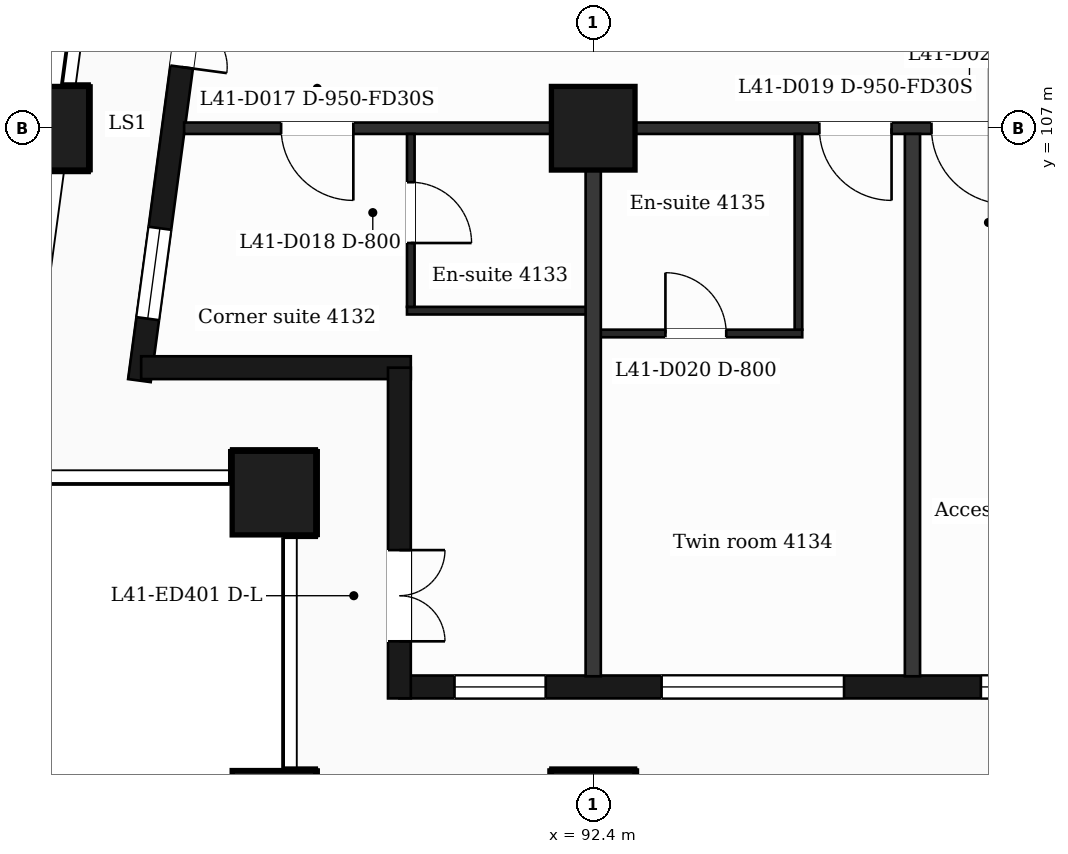
"""IFC4 building model, lengths in metres.
Left out: names, types, materials, properties, quantities, classifications, styles, units other than length and angle.
Written with IfcOpenShell. Run it as: python <this file> out.ifc"""

import sys

from ifc_helpers import new_model, si_unit, direction, frame, frame_2d, origin, origin_2d, place, context, subcontext, project, spatial, rectangle, extrude, element, fill, save


model = new_model("IFC4")
c1 = context("Model", 3, precision=1e-05, world=origin(), true_north=direction((0.0, 1.0)))
c2 = subcontext(c1, "Body", "Model", "MODEL_VIEW")
j1 = project(units=[si_unit("LENGTHUNIT", "METRE"), si_unit("PLANEANGLEUNIT", "RADIAN")], contexts=[c1])
p1 = place(None, origin())
s1 = spatial("IfcSite", under=j1, at=p1, CompositionType="ELEMENT")
p2 = place(p1, origin())
s2 = spatial("IfcBuilding", under=s1, at=p2, CompositionType="ELEMENT")
p3 = place(p2, frame((0.0, 0.0, 173.7)))
s3 = spatial("IfcBuildingStorey", under=s2, at=p3, CompositionType="ELEMENT", Elevation=173.7)
for number, where, z_axis, x_axis in (
    (1, (92.4, 98.0, 0.0), (0.0, 0.0, 1.0), (1.0, 0.0, 0.0)),
    (2, (88.2, 98.0, 0.0), (0.0, 0.0, 1.0), (1.0, 0.0, 0.0)),
    (3, (88.2, 102.2, 0.0), (0.0, 0.0, 1.0), (1.0, 0.0, 0.0)),
    (4, (92.4, 107.0, 0.0), (0.0, 0.0, 1.0), (1.0, 0.0, 0.0)),
    (5, (85.211, 107.0, 0.0), (0.0, 0.0, 1.0), (1.0, 0.0, 0.0)),
):
    element("IfcColumn", number, at=place(p3, frame(where, z_axis=z_axis, x_axis=x_axis)), inside=s3, PredefinedType="COLUMN", context=c2, shape_type="SweptSolid", body=[
        extrude(rectangle(XDim=1.1, YDim=1.1, at=origin_2d()), origin(), (0.0, 0.0, 1.0), 3.7),
    ])
p4 = place(p3, frame((89.85, 99.65, 0.0), z_axis=(0.0, 0.0, 1.0), x_axis=(1.0, 0.0, 0.0)))
e6 = element("IfcWall", 6, at=p4, inside=s3, PredefinedType="SOLIDWALL", context=c2, shape_type="SweptSolid", body=[
    extrude(rectangle(XDim=47.25, YDim=0.3, at=frame_2d((23.625, 0.0))), origin(), (0.0, 0.0, 1.0), 3.38),
])
p5 = place(p4, frame((0.725, 0.0, 0.9)))
e7 = element("IfcOpeningElement", 7, at=p5, cuts=e6, PredefinedType="OPENING", context=c2, shape_type="SweptSolid", body=[
    extrude(rectangle(XDim=1.2, YDim=2.1, at=frame_2d((0.6, 1.05))), frame((0.0, 0.16, 0.0), z_axis=(0.0, -1.0, 0.0), x_axis=(1.0, 0.0, 0.0)), (0.0, 0.0, 1.0), 0.32),
])
p6 = place(p4, frame((3.45, 0.0, 0.9)))
e8 = element("IfcOpeningElement", 8, at=p6, cuts=e6, PredefinedType="OPENING", context=c2, shape_type="SweptSolid", body=[
    extrude(rectangle(XDim=2.4, YDim=2.1, at=frame_2d((1.2, 1.05))), frame((0.0, 0.16, 0.0), z_axis=(0.0, -1.0, 0.0), x_axis=(1.0, 0.0, 0.0)), (0.0, 0.0, 1.0), 0.32),
])
p7 = place(p4, frame((7.65, 0.0, 0.9)))
e9 = element("IfcOpeningElement", 9, at=p7, cuts=e6, PredefinedType="OPENING", context=c2, shape_type="SweptSolid", body=[
    extrude(rectangle(XDim=2.4, YDim=2.1, at=frame_2d((1.2, 1.05))), frame((0.0, 0.16, 0.0), z_axis=(0.0, -1.0, 0.0), x_axis=(1.0, 0.0, 0.0)), (0.0, 0.0, 1.0), 0.32),
])
p8 = place(p4, frame((11.85, 0.0, 0.9)))
e10 = element("IfcOpeningElement", 10, at=p8, cuts=e6, PredefinedType="OPENING", context=c2, shape_type="SweptSolid", body=[
    extrude(rectangle(XDim=2.4, YDim=2.1, at=frame_2d((1.2, 1.05))), frame((0.0, 0.16, 0.0), z_axis=(0.0, -1.0, 0.0), x_axis=(1.0, 0.0, 0.0)), (0.0, 0.0, 1.0), 0.32),
])
p9 = place(p4, frame((16.05, 0.0, 0.9)))
e11 = element("IfcOpeningElement", 11, at=p9, cuts=e6, PredefinedType="OPENING", context=c2, shape_type="SweptSolid", body=[
    extrude(rectangle(XDim=2.4, YDim=2.1, at=frame_2d((1.2, 1.05))), frame((0.0, 0.16, 0.0), z_axis=(0.0, -1.0, 0.0), x_axis=(1.0, 0.0, 0.0)), (0.0, 0.0, 1.0), 0.32),
])
p10 = place(p4, frame((20.25, 0.0, 0.9)))
e12 = element("IfcOpeningElement", 12, at=p10, cuts=e6, PredefinedType="OPENING", context=c2, shape_type="SweptSolid", body=[
    extrude(rectangle(XDim=2.4, YDim=2.1, at=frame_2d((1.2, 1.05))), frame((0.0, 0.16, 0.0), z_axis=(0.0, -1.0, 0.0), x_axis=(1.0, 0.0, 0.0)), (0.0, 0.0, 1.0), 0.32),
])
p11 = place(p4, frame((25.05, 0.0, 0.9)))
e13 = element("IfcOpeningElement", 13, at=p11, cuts=e6, PredefinedType="OPENING", context=c2, shape_type="SweptSolid", body=[
    extrude(rectangle(XDim=1.2, YDim=2.1, at=frame_2d((0.6, 1.05))), frame((0.0, 0.16, 0.0), z_axis=(0.0, -1.0, 0.0), x_axis=(1.0, 0.0, 0.0)), (0.0, 0.0, 1.0), 0.32),
])
p12 = place(p4, frame((29.25, 0.0, 0.9)))
e14 = element("IfcOpeningElement", 14, at=p12, cuts=e6, PredefinedType="OPENING", context=c2, shape_type="SweptSolid", body=[
    extrude(rectangle(XDim=1.2, YDim=2.1, at=frame_2d((0.6, 1.05))), frame((0.0, 0.16, 0.0), z_axis=(0.0, -1.0, 0.0), x_axis=(1.0, 0.0, 0.0)), (0.0, 0.0, 1.0), 0.32),
])
p13 = place(p4, frame((32.55, 0.0, 0.0)))
e15 = element("IfcOpeningElement", 15, at=p13, cuts=e6, PredefinedType="OPENING", context=c2, shape_type="SweptSolid", body=[
    extrude(rectangle(XDim=1.2, YDim=2.4, at=frame_2d((0.6, 1.2))), frame((0.0, 0.16, 0.0), z_axis=(0.0, -1.0, 0.0), x_axis=(1.0, 0.0, 0.0)), (0.0, 0.0, 1.0), 0.32),
])
p14 = place(p4, frame((34.35, 0.0, 0.9)))
e16 = element("IfcOpeningElement", 16, at=p14, cuts=e6, PredefinedType="OPENING", context=c2, shape_type="SweptSolid", body=[
    extrude(rectangle(XDim=1.2, YDim=2.1, at=frame_2d((0.6, 1.05))), frame((0.0, 0.16, 0.0), z_axis=(0.0, -1.0, 0.0), x_axis=(1.0, 0.0, 0.0)), (0.0, 0.0, 1.0), 0.32),
])
p15 = place(p4, frame((37.05, 0.0, 0.9)))
e17 = element("IfcOpeningElement", 17, at=p15, cuts=e6, PredefinedType="OPENING", context=c2, shape_type="SweptSolid", body=[
    extrude(rectangle(XDim=2.4, YDim=2.1, at=frame_2d((1.2, 1.05))), frame((0.0, 0.16, 0.0), z_axis=(0.0, -1.0, 0.0), x_axis=(1.0, 0.0, 0.0)), (0.0, 0.0, 1.0), 0.32),
])
p16 = place(p4, frame((40.95, 0.0, 0.0)))
e18 = element("IfcOpeningElement", 18, at=p16, cuts=e6, PredefinedType="OPENING", context=c2, shape_type="SweptSolid", body=[
    extrude(rectangle(XDim=1.2, YDim=2.4, at=frame_2d((0.6, 1.2))), frame((0.0, 0.16, 0.0), z_axis=(0.0, -1.0, 0.0), x_axis=(1.0, 0.0, 0.0)), (0.0, 0.0, 1.0), 0.32),
])
p17 = place(p4, frame((42.75, 0.0, 0.9)))
e19 = element("IfcOpeningElement", 19, at=p17, cuts=e6, PredefinedType="OPENING", context=c2, shape_type="SweptSolid", body=[
    extrude(rectangle(XDim=1.2, YDim=2.1, at=frame_2d((0.6, 1.05))), frame((0.0, 0.16, 0.0), z_axis=(0.0, -1.0, 0.0), x_axis=(1.0, 0.0, 0.0)), (0.0, 0.0, 1.0), 0.32),
])
p18 = place(p4, frame((45.25, 0.0, 0.9)))
e20 = element("IfcOpeningElement", 20, at=p18, cuts=e6, PredefinedType="OPENING", context=c2, shape_type="SweptSolid", body=[
    extrude(rectangle(XDim=1.2, YDim=2.1, at=frame_2d((0.6, 1.05))), frame((0.0, 0.16, 0.0), z_axis=(0.0, -1.0, 0.0), x_axis=(1.0, 0.0, 0.0)), (0.0, 0.0, 1.0), 0.32),
])
p19 = place(p3, frame((87.334, 110.4, 0.0), z_axis=(0.0, 0.0, 1.0), x_axis=(-0.133437175554, -0.991057273915, 0.0)))
e21 = element("IfcWall", 21, at=p19, inside=s3, PredefinedType="SOLIDWALL", context=c2, shape_type="SweptSolid", body=[
    extrude(rectangle(XDim=6.781, YDim=0.3, at=frame_2d((3.39, 0.0))), origin(), (0.0, 0.0, 1.0), 3.38),
])
p20 = place(p19, frame((1.418, 0.0, 0.0)))
e22 = element("IfcOpeningElement", 22, at=p20, cuts=e21, PredefinedType="OPENING", context=c2, shape_type="SweptSolid", body=[
    extrude(rectangle(XDim=1.2, YDim=2.4, at=frame_2d((0.6, 1.2))), frame((0.0, 0.16, 0.0), z_axis=(0.0, -1.0, 0.0), x_axis=(1.0, 0.0, 0.0)), (0.0, 0.0, 1.0), 0.32),
])
p21 = place(p19, frame((4.758, 0.0, 0.9)))
e23 = element("IfcOpeningElement", 23, at=p21, cuts=e21, PredefinedType="OPENING", context=c2, shape_type="SweptSolid", body=[
    extrude(rectangle(XDim=1.2, YDim=2.1, at=frame_2d((0.6, 1.05))), frame((0.0, 0.16, 0.0), z_axis=(0.0, -1.0, 0.0), x_axis=(1.0, 0.0, 0.0)), (0.0, 0.0, 1.0), 0.32),
])
p22 = place(p3, frame((86.452, 103.85, 0.0), z_axis=(0.0, 0.0, 1.0), x_axis=(1.0, 0.0, 0.0)))
e24 = element("IfcWall", 24, at=p22, inside=s3, PredefinedType="SOLIDWALL", context=c2, shape_type="SweptSolid", body=[
    extrude(rectangle(XDim=3.548, YDim=0.3, at=frame_2d((1.774, 0.0))), origin(), (0.0, 0.0, 1.0), 3.38),
])
p23 = place(p3, frame((89.85, 103.85, 0.0), z_axis=(0.0, 0.0, 1.0), x_axis=(0.0, -1.0, 0.0)))
e25 = element("IfcWall", 25, at=p23, inside=s3, PredefinedType="SOLIDWALL", context=c2, shape_type="SweptSolid", body=[
    extrude(rectangle(XDim=4.35, YDim=0.3, at=frame_2d((2.175, 0.0))), origin(), (0.0, 0.0, 1.0), 3.38),
])
p24 = place(p23, frame((2.4, 0.0, 0.0)))
e26 = element("IfcOpeningElement", 26, at=p24, cuts=e25, PredefinedType="OPENING", context=c2, shape_type="SweptSolid", body=[
    extrude(rectangle(XDim=1.2, YDim=2.4, at=frame_2d((0.6, 1.2))), frame((0.0, 0.16, 0.0), z_axis=(0.0, -1.0, 0.0), x_axis=(1.0, 0.0, 0.0)), (0.0, 0.0, 1.0), 0.32),
])
p25 = place(p3, frame((92.4, 104.3, 0.0), z_axis=(0.0, 0.0, 1.0), x_axis=(1.0, 0.0, 0.0)))
e27 = element("IfcWall", 27, at=p25, inside=s3, PredefinedType="PARTITIONING", context=c2, shape_type="SweptSolid", body=[
    extrude(rectangle(XDim=2.75, YDim=0.1, at=frame_2d((1.375, 0.0))), origin(), (0.0, 0.0, 1.0), 3.38),
])
p26 = place(p25, frame((0.95, 0.0, 0.0)))
e28 = element("IfcOpeningElement", 28, at=p26, cuts=e27, PredefinedType="OPENING", context=c2, shape_type="SweptSolid", body=[
    extrude(rectangle(XDim=0.8, YDim=2.1, at=frame_2d((0.4, 1.05))), frame((0.0, 0.06, 0.0), z_axis=(0.0, -1.0, 0.0), x_axis=(1.0, 0.0, 0.0)), (0.0, 0.0, 1.0), 0.12),
])
p27 = place(p3, frame((89.95, 104.6, 0.0), z_axis=(0.0, 0.0, 1.0), x_axis=(1.0, 0.0, 0.0)))
e29 = element("IfcWall", 29, at=p27, inside=s3, PredefinedType="PARTITIONING", context=c2, shape_type="SweptSolid", body=[
    extrude(rectangle(XDim=2.45, YDim=0.1, at=frame_2d((1.225, 0.0))), origin(), (0.0, 0.0, 1.0), 3.38),
])
p28 = place(p3, frame((87.018, 107.0, 0.0), z_axis=(0.0, 0.0, 1.0), x_axis=(1.0, 0.0, 0.0)))
e30 = element("IfcWall", 30, at=p28, inside=s3, PredefinedType="PARTITIONING", context=c2, shape_type="SweptSolid", body=[
    extrude(rectangle(XDim=52.765, YDim=0.15, at=frame_2d((26.382, 0.0))), origin(), (0.0, 0.0, 1.0), 3.38),
])
p29 = place(p28, frame((1.276, 0.0, 0.0)))
e31 = element("IfcOpeningElement", 31, at=p29, cuts=e30, PredefinedType="OPENING", context=c2, shape_type="SweptSolid", body=[
    extrude(rectangle(XDim=0.95, YDim=2.1, at=frame_2d((0.475, 1.05))), frame((0.0, 0.085, 0.0), z_axis=(0.0, -1.0, 0.0), x_axis=(1.0, 0.0, 0.0)), (0.0, 0.0, 1.0), 0.17),
])
p30 = place(p28, frame((8.357, 0.0, 0.0)))
e32 = element("IfcOpeningElement", 32, at=p30, cuts=e30, PredefinedType="OPENING", context=c2, shape_type="SweptSolid", body=[
    extrude(rectangle(XDim=0.95, YDim=2.1, at=frame_2d((0.475, 1.05))), frame((0.0, 0.085, 0.0), z_axis=(0.0, -1.0, 0.0), x_axis=(1.0, 0.0, 0.0)), (0.0, 0.0, 1.0), 0.17),
])
p31 = place(p28, frame((9.832, 0.0, 0.0)))
e33 = element("IfcOpeningElement", 33, at=p31, cuts=e30, PredefinedType="OPENING", context=c2, shape_type="SweptSolid", body=[
    extrude(rectangle(XDim=1.0, YDim=2.1, at=frame_2d((0.5, 1.05))), frame((0.0, 0.085, 0.0), z_axis=(0.0, -1.0, 0.0), x_axis=(1.0, 0.0, 0.0)), (0.0, 0.0, 1.0), 0.17),
])
p32 = place(p28, frame((14.547, 0.0, 0.0)))
e34 = element("IfcOpeningElement", 34, at=p32, cuts=e30, PredefinedType="OPENING", context=c2, shape_type="SweptSolid", body=[
    extrude(rectangle(XDim=0.95, YDim=2.1, at=frame_2d((0.475, 1.05))), frame((0.0, 0.085, 0.0), z_axis=(0.0, -1.0, 0.0), x_axis=(1.0, 0.0, 0.0)), (0.0, 0.0, 1.0), 0.17),
])
p33 = place(p28, frame((18.257, 0.0, 0.0)))
e35 = element("IfcOpeningElement", 35, at=p33, cuts=e30, PredefinedType="OPENING", context=c2, shape_type="SweptSolid", body=[
    extrude(rectangle(XDim=0.95, YDim=2.1, at=frame_2d((0.475, 1.05))), frame((0.0, 0.085, 0.0), z_axis=(0.0, -1.0, 0.0), x_axis=(1.0, 0.0, 0.0)), (0.0, 0.0, 1.0), 0.17),
])
p34 = place(p28, frame((25.212, 0.0, 0.0)))
e36 = element("IfcOpeningElement", 36, at=p34, cuts=e30, PredefinedType="OPENING", context=c2, shape_type="SweptSolid", body=[
    extrude(rectangle(XDim=1.0, YDim=2.1, at=frame_2d((0.5, 1.05))), frame((0.0, 0.085, 0.0), z_axis=(0.0, -1.0, 0.0), x_axis=(1.0, 0.0, 0.0)), (0.0, 0.0, 1.0), 0.17),
])
p35 = place(p28, frame((37.267, 0.0, 0.0)))
e37 = element("IfcOpeningElement", 37, at=p35, cuts=e30, PredefinedType="OPENING", context=c2, shape_type="SweptSolid", body=[
    extrude(rectangle(XDim=0.95, YDim=2.1, at=frame_2d((0.475, 1.05))), frame((0.0, 0.085, 0.0), z_axis=(0.0, -1.0, 0.0), x_axis=(1.0, 0.0, 0.0)), (0.0, 0.0, 1.0), 0.17),
])
p36 = place(p28, frame((41.957, 0.0, 0.0)))
e38 = element("IfcOpeningElement", 38, at=p36, cuts=e30, PredefinedType="OPENING", context=c2, shape_type="SweptSolid", body=[
    extrude(rectangle(XDim=0.95, YDim=2.1, at=frame_2d((0.475, 1.05))), frame((0.0, 0.085, 0.0), z_axis=(0.0, -1.0, 0.0), x_axis=(1.0, 0.0, 0.0)), (0.0, 0.0, 1.0), 0.17),
])
p37 = place(p28, frame((45.632, 0.0, 0.0)))
e39 = element("IfcOpeningElement", 39, at=p37, cuts=e30, PredefinedType="OPENING", context=c2, shape_type="SweptSolid", body=[
    extrude(rectangle(XDim=0.95, YDim=2.1, at=frame_2d((0.475, 1.05))), frame((0.0, 0.085, 0.0), z_axis=(0.0, -1.0, 0.0), x_axis=(1.0, 0.0, 0.0)), (0.0, 0.0, 1.0), 0.17),
])
p38 = place(p28, frame((48.767, 0.0, 0.0)))
e40 = element("IfcOpeningElement", 40, at=p38, cuts=e30, PredefinedType="OPENING", context=c2, shape_type="SweptSolid", body=[
    extrude(rectangle(XDim=0.95, YDim=2.1, at=frame_2d((0.475, 1.05))), frame((0.0, 0.085, 0.0), z_axis=(0.0, -1.0, 0.0), x_axis=(1.0, 0.0, 0.0)), (0.0, 0.0, 1.0), 0.17),
])
p39 = place(p3, frame((90.0, 104.65, 0.0), z_axis=(0.0, 0.0, 1.0), x_axis=(0.0, 1.0, 0.0)))
e41 = element("IfcWall", 41, at=p39, inside=s3, PredefinedType="PARTITIONING", context=c2, shape_type="SweptSolid", body=[
    extrude(rectangle(XDim=2.275, YDim=0.1, at=frame_2d((1.138, 0.0))), origin(), (0.0, 0.0, 1.0), 3.38),
])
p40 = place(p39, frame((0.84, 0.0, 0.0)))
e42 = element("IfcOpeningElement", 42, at=p40, cuts=e41, PredefinedType="OPENING", context=c2, shape_type="SweptSolid", body=[
    extrude(rectangle(XDim=0.8, YDim=2.1, at=frame_2d((0.4, 1.05))), frame((0.0, 0.06, 0.0), z_axis=(0.0, -1.0, 0.0), x_axis=(1.0, 0.0, 0.0)), (0.0, 0.0, 1.0), 0.12),
])
p41 = place(p3, frame((92.4, 99.79, 0.0), z_axis=(0.0, 0.0, 1.0), x_axis=(0.0, 1.0, 0.0)))
e43 = element("IfcWall", 43, at=p41, inside=s3, PredefinedType="PARTITIONING", context=c2, shape_type="SweptSolid", body=[
    extrude(rectangle(XDim=7.135, YDim=0.2, at=frame_2d((3.567, 0.0))), origin(), (0.0, 0.0, 1.0), 3.38),
])
p42 = place(p3, frame((95.1, 104.35, 0.0), z_axis=(0.0, 0.0, 1.0), x_axis=(0.0, 1.0, 0.0)))
e44 = element("IfcWall", 44, at=p42, inside=s3, PredefinedType="PARTITIONING", context=c2, shape_type="SweptSolid", body=[
    extrude(rectangle(XDim=2.575, YDim=0.1, at=frame_2d((1.288, 0.0))), origin(), (0.0, 0.0, 1.0), 3.38),
])
p43 = place(p3, frame((96.6, 99.79, 0.0), z_axis=(0.0, 0.0, 1.0), x_axis=(0.0, 1.0, 0.0)))
e45 = element("IfcWall", 45, at=p43, inside=s3, PredefinedType="PARTITIONING", context=c2, shape_type="SweptSolid", body=[
    extrude(rectangle(XDim=7.135, YDim=0.2, at=frame_2d((3.567, 0.0))), origin(), (0.0, 0.0, 1.0), 3.38),
])
p44 = place(p5, origin())
e46 = element("IfcWindow", 46, at=p44, inside=s3, PartitioningType="SINGLE_PANEL", PredefinedType="WINDOW", context=c2, shape_type="SweptSolid", body=[
    extrude(rectangle(XDim=1.2, YDim=2.1, at=frame_2d((0.6, 1.05))), frame((0.0, 0.03, 0.0), z_axis=(0.0, -1.0, 0.0), x_axis=(1.0, 0.0, 0.0)), (0.0, 0.0, 1.0), 0.06),
])
fill(e7, e46)
p45 = place(p6, origin())
e47 = element("IfcWindow", 47, at=p45, inside=s3, PartitioningType="SINGLE_PANEL", PredefinedType="WINDOW", context=c2, shape_type="SweptSolid", body=[
    extrude(rectangle(XDim=2.4, YDim=2.1, at=frame_2d((1.2, 1.05))), frame((0.0, 0.03, 0.0), z_axis=(0.0, -1.0, 0.0), x_axis=(1.0, 0.0, 0.0)), (0.0, 0.0, 1.0), 0.06),
])
fill(e8, e47)
p46 = place(p7, origin())
e48 = element("IfcWindow", 48, at=p46, inside=s3, PartitioningType="SINGLE_PANEL", PredefinedType="WINDOW", context=c2, shape_type="SweptSolid", body=[
    extrude(rectangle(XDim=2.4, YDim=2.1, at=frame_2d((1.2, 1.05))), frame((0.0, 0.03, 0.0), z_axis=(0.0, -1.0, 0.0), x_axis=(1.0, 0.0, 0.0)), (0.0, 0.0, 1.0), 0.06),
])
fill(e9, e48)
p47 = place(p20, origin())
e49 = element("IfcDoor", 49, at=p47, inside=s3, OperationType="DOUBLE_DOOR_SINGLE_SWING", PredefinedType="DOOR", context=c2, shape_type="SweptSolid", body=[
    extrude(rectangle(XDim=1.2, YDim=2.4, at=frame_2d((0.6, 1.2))), frame((0.0, 0.025, 0.0), z_axis=(0.0, -1.0, 0.0), x_axis=(1.0, 0.0, 0.0)), (0.0, 0.0, 1.0), 0.05),
])
fill(e22, e49)
p48 = place(p21, origin())
e50 = element("IfcWindow", 50, at=p48, inside=s3, PartitioningType="SINGLE_PANEL", PredefinedType="WINDOW", context=c2, shape_type="SweptSolid", body=[
    extrude(rectangle(XDim=1.2, YDim=2.1, at=frame_2d((0.6, 1.05))), frame((0.0, 0.03, 0.0), z_axis=(0.0, -1.0, 0.0), x_axis=(1.0, 0.0, 0.0)), (0.0, 0.0, 1.0), 0.06),
])
fill(e23, e50)
p49 = place(p24, origin())
e51 = element("IfcDoor", 51, at=p49, inside=s3, OperationType="DOUBLE_DOOR_SINGLE_SWING", PredefinedType="DOOR", context=c2, shape_type="SweptSolid", body=[
    extrude(rectangle(XDim=1.2, YDim=2.4, at=frame_2d((0.6, 1.2))), frame((0.0, 0.025, 0.0), z_axis=(0.0, -1.0, 0.0), x_axis=(1.0, 0.0, 0.0)), (0.0, 0.0, 1.0), 0.05),
])
fill(e26, e51)
p50 = place(p29, origin())
e52 = element("IfcDoor", 52, at=p50, inside=s3, OperationType="SINGLE_SWING_RIGHT", PredefinedType="DOOR", context=c2, shape_type="SweptSolid", body=[
    extrude(rectangle(XDim=0.95, YDim=2.1, at=frame_2d((0.475, 1.05))), frame((0.0, 0.025, 0.0), z_axis=(0.0, -1.0, 0.0), x_axis=(1.0, 0.0, 0.0)), (0.0, 0.0, 1.0), 0.05),
])
fill(e31, e52)
p51 = place(p40, origin())
e53 = element("IfcDoor", 53, at=p51, inside=s3, OperationType="SINGLE_SWING_LEFT", PredefinedType="DOOR", context=c2, shape_type="SweptSolid", body=[
    extrude(rectangle(XDim=0.8, YDim=2.1, at=frame_2d((0.4, 1.05))), frame((0.0, 0.025, 0.0), z_axis=(0.0, -1.0, 0.0), x_axis=(1.0, 0.0, 0.0)), (0.0, 0.0, 1.0), 0.05),
])
fill(e42, e53)
p52 = place(p30, origin())
e54 = element("IfcDoor", 54, at=p52, inside=s3, OperationType="SINGLE_SWING_RIGHT", PredefinedType="DOOR", context=c2, shape_type="SweptSolid", body=[
    extrude(rectangle(XDim=0.95, YDim=2.1, at=frame_2d((0.475, 1.05))), frame((0.0, 0.025, 0.0), z_axis=(0.0, -1.0, 0.0), x_axis=(1.0, 0.0, 0.0)), (0.0, 0.0, 1.0), 0.05),
])
fill(e32, e54)
p53 = place(p26, origin())
e55 = element("IfcDoor", 55, at=p53, inside=s3, OperationType="SINGLE_SWING_LEFT", PredefinedType="DOOR", context=c2, shape_type="SweptSolid", body=[
    extrude(rectangle(XDim=0.8, YDim=2.1, at=frame_2d((0.4, 1.05))), frame((0.0, 0.025, 0.0), z_axis=(0.0, -1.0, 0.0), x_axis=(1.0, 0.0, 0.0)), (0.0, 0.0, 1.0), 0.05),
])
fill(e28, e55)
p54 = place(p31, origin())
e56 = element("IfcDoor", 56, at=p54, inside=s3, OperationType="SINGLE_SWING_RIGHT", PredefinedType="DOOR", context=c2, shape_type="SweptSolid", body=[
    extrude(rectangle(XDim=1.0, YDim=2.1, at=frame_2d((0.5, 1.05))), frame((0.0, 0.025, 0.0), z_axis=(0.0, -1.0, 0.0), x_axis=(1.0, 0.0, 0.0)), (0.0, 0.0, 1.0), 0.05),
])
fill(e33, e56)
save(model, sys.argv[1])
